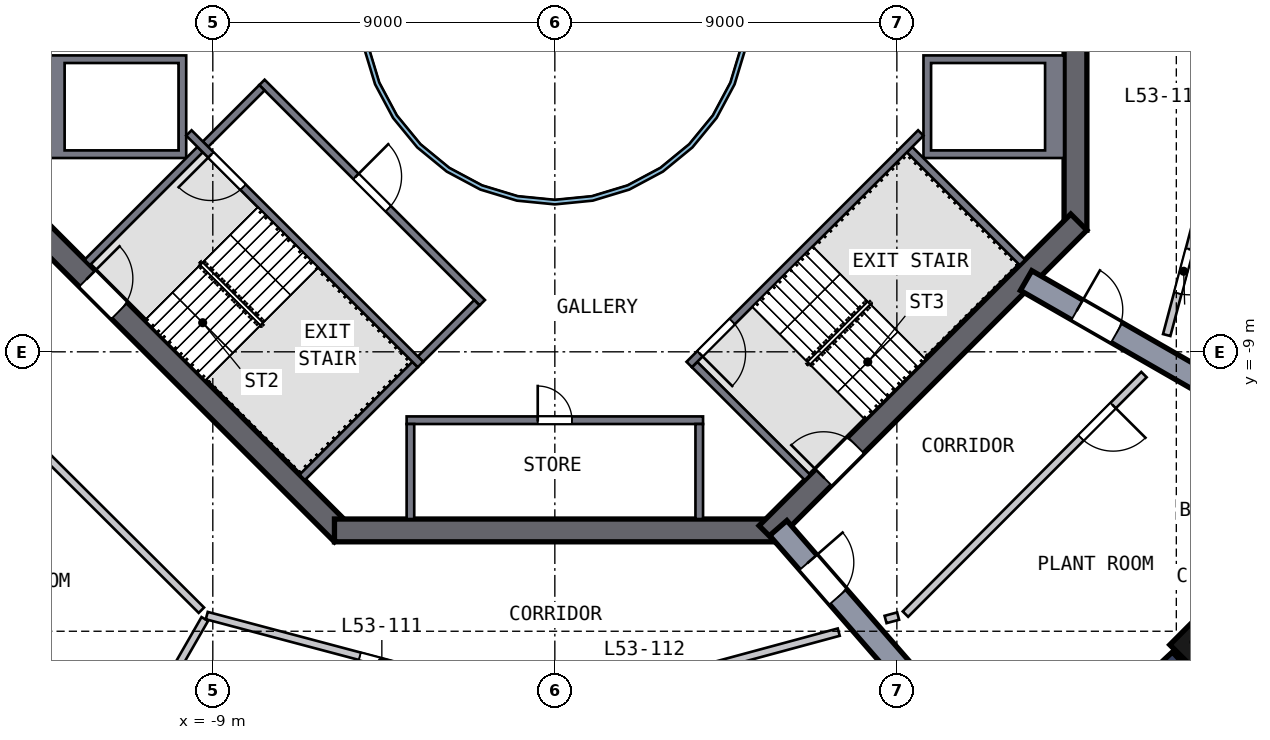
"""IFC4 building model, lengths in metres.
Left out: names, types, materials, properties, quantities, classifications, styles, units other than length and angle.
Written with IfcOpenShell. Run it as: python <this file> out.ifc"""

import sys

from ifc_helpers import new_model, si_unit, direction, frame, frame_2d, origin, origin_2d, place, context, subcontext, project, spatial, polyline, rectangle, outline, extrude, element, fill, save


model = new_model("IFC4")
c1 = context("Model", 3, precision=1e-05, world=origin(), true_north=direction((0.0, 1.0)))
c2 = subcontext(c1, "Body", "Model", "MODEL_VIEW")
j1 = project(units=[si_unit("LENGTHUNIT", "METRE"), si_unit("PLANEANGLEUNIT", "RADIAN")], contexts=[c1])
p1 = place(None, origin())
s1 = spatial("IfcSite", under=j1, at=p1, CompositionType="ELEMENT")
p2 = place(p1, origin())
s2 = spatial("IfcBuilding", under=s1, at=p2, CompositionType="ELEMENT")
p3 = place(p2, frame((0.0, 0.0, 216.0)))
s3 = spatial("IfcBuildingStorey", under=s2, at=p3, CompositionType="ELEMENT", Elevation=216.0)
p4 = place(p3, frame((16.764, -16.694, 0.0), z_axis=(0.046123414, 0.047097852, 0.997824846), x_axis=(0.704128528, 0.707006185, -0.065918668)))
e1 = element("IfcColumn", 1, at=p4, inside=s3, PredefinedType="COLUMN", context=c2, shape_type="SweptSolid", body=[
    extrude(rectangle(XDim=1.0, YDim=0.8, at=origin_2d()), origin(), (0.0, 0.0, 1.0), 4.51),
])
p5 = place(p3, frame((13.7, -5.799, 0.0), z_axis=(0.0, 0.0, 1.0), x_axis=(0.0, 1.0, 0.0)))
e2 = element("IfcWall", 2, at=p5, inside=s3, PredefinedType="SHEAR", context=c2, shape_type="SweptSolid", body=[
    extrude(rectangle(XDim=11.598, YDim=0.6, at=frame_2d((5.799, 0.0))), origin(), (0.0, 0.0, 1.0), 6.0),
])
p6 = place(p5, frame((4.899, 0.0, 0.0)))
e3 = element("IfcOpeningElement", 3, at=p6, cuts=e2, PredefinedType="OPENING", context=c2, shape_type="SweptSolid", body=[
    extrude(rectangle(XDim=1.8, YDim=2.1, at=frame_2d((0.9, 1.05))), frame((0.0, 0.31, 0.0), z_axis=(0.0, -1.0, 0.0), x_axis=(1.0, 0.0, 0.0)), (0.0, 0.0, 1.0), 0.62),
])
p7 = place(p3, frame((-13.788, -5.587, 0.0), z_axis=(0.0, 0.0, 1.0), x_axis=(0.707106781, -0.707106781, 0.0)))
e4 = element("IfcWall", 4, at=p7, inside=s3, PredefinedType="SHEAR", context=c2, shape_type="SweptSolid", body=[
    extrude(rectangle(XDim=11.598, YDim=0.6, at=frame_2d((5.799, 0.0))), origin(), (0.0, 0.0, 1.0), 6.0),
])
p8 = place(p7, frame((2.099, 0.0, 0.0)))
e5 = element("IfcOpeningElement", 5, at=p8, cuts=e4, PredefinedType="OPENING", context=c2, shape_type="SweptSolid", body=[
    extrude(rectangle(XDim=1.2, YDim=2.1, at=frame_2d((0.6, 1.05))), frame((0.0, 0.31, 0.0), z_axis=(0.0, -1.0, 0.0), x_axis=(1.0, 0.0, 0.0)), (0.0, 0.0, 1.0), 0.62),
])
p9 = place(p3, frame((-5.799, -13.7, 0.0), z_axis=(0.0, 0.0, 1.0), x_axis=(1.0, 0.0, 0.0)))
e6 = element("IfcWall", 6, at=p9, inside=s3, PredefinedType="SHEAR", context=c2, shape_type="SweptSolid", body=[
    extrude(rectangle(XDim=11.598, YDim=0.6, at=frame_2d((5.799, 0.0))), origin(), (0.0, 0.0, 1.0), 6.0),
])
p10 = place(p3, frame((5.587, -13.788, 0.0), z_axis=(0.0, 0.0, 1.0), x_axis=(0.707106781, 0.707106781, 0.0)))
e7 = element("IfcWall", 7, at=p10, inside=s3, PredefinedType="SHEAR", context=c2, shape_type="SweptSolid", body=[
    extrude(rectangle(XDim=11.598, YDim=0.6, at=frame_2d((5.799, 0.0))), origin(), (0.0, 0.0, 1.0), 6.0),
])
p11 = place(p10, frame((2.099, 0.0, 0.0)))
e8 = element("IfcOpeningElement", 8, at=p11, cuts=e7, PredefinedType="OPENING", context=c2, shape_type="SweptSolid", body=[
    extrude(rectangle(XDim=1.2, YDim=2.1, at=frame_2d((0.6, 1.05))), frame((0.0, 0.31, 0.0), z_axis=(0.0, -1.0, 0.0), x_axis=(1.0, 0.0, 0.0)), (0.0, 0.0, 1.0), 0.62),
])
p12 = place(p3, frame((-16.34, -17.117, 0.0), z_axis=(0.0, 0.0, 1.0), x_axis=(0.708579493, -0.705630996, 0.0)))
e9 = element("IfcWall", 9, at=p12, inside=s3, PredefinedType="SHEAR", context=c2, shape_type="SweptSolid", body=[
    extrude(rectangle(XDim=5.713, YDim=0.4, at=frame_2d((2.857, 0.0))), origin(), (0.0, 0.0, 1.0), 4.5),
])
p13 = place(p3, frame((12.593, -20.586, 0.0), z_axis=(0.0, 0.0, 1.0), x_axis=(0.731095933, 0.682274678, 0.0)))
e10 = element("IfcWall", 10, at=p13, inside=s3, PredefinedType="SHEAR", context=c2, shape_type="SweptSolid", body=[
    extrude(rectangle(XDim=5.191, YDim=0.4, at=frame_2d((2.595, 0.0))), origin(), (0.0, 0.0, 1.0), 4.5),
])
p14 = place(p3, frame((5.879, -13.638, 0.0), z_axis=(0.0, 0.0, 1.0), x_axis=(0.656669219, -0.754178716, 0.0)))
e11 = element("IfcWall", 11, at=p14, inside=s3, PredefinedType="SHEAR", context=c2, shape_type="SweptSolid", body=[
    extrude(rectangle(XDim=9.276, YDim=0.6, at=frame_2d((4.638, 0.0))), origin(), (0.0, 0.0, 1.0), 4.5),
])
p15 = place(p14, frame((1.2, 0.0, 0.0)))
e12 = element("IfcOpeningElement", 12, at=p15, cuts=e11, PredefinedType="OPENING", context=c2, shape_type="SweptSolid", body=[
    extrude(rectangle(XDim=1.2, YDim=2.1, at=frame_2d((0.6, 1.05))), frame((0.0, 0.31, 0.0), z_axis=(0.0, -1.0, 0.0), x_axis=(1.0, 0.0, 0.0)), (0.0, 0.0, 1.0), 0.62),
])
p16 = place(p3, frame((12.401, -7.125, 0.0), z_axis=(0.0, 0.0, 1.0), x_axis=(0.867072189, -0.498182515, 0.0)))
e13 = element("IfcWall", 13, at=p16, inside=s3, PredefinedType="SHEAR", context=c2, shape_type="SweptSolid", body=[
    extrude(rectangle(XDim=9.553, YDim=0.6, at=frame_2d((4.776, 0.0))), origin(), (0.0, 0.0, 1.0), 4.5),
])
p17 = place(p16, frame((1.55, 0.0, 0.0)))
e14 = element("IfcOpeningElement", 14, at=p17, cuts=e13, PredefinedType="OPENING", context=c2, shape_type="SweptSolid", body=[
    extrude(rectangle(XDim=1.2, YDim=2.1, at=frame_2d((0.6, 1.05))), frame((0.0, 0.31, 0.0), z_axis=(0.0, -1.0, 0.0), x_axis=(1.0, 0.0, 0.0)), (0.0, 0.0, 1.0), 0.62),
])
p18 = place(p3, frame((-21.67, -12.549, 0.0), z_axis=(0.0, 0.0, 1.0), x_axis=(0.708589659, -0.705620787, 0.0)))
e15 = element("IfcWall", 15, at=p18, inside=s3, PredefinedType="SOLIDWALL", context=c2, shape_type="SweptSolid", body=[
    extrude(rectangle(XDim=13.075, YDim=0.15, at=frame_2d((6.538, 0.0))), origin(), (0.0, 0.0, 1.0), 4.5),
])
p19 = place(p3, frame((12.549, -21.67, 0.0), z_axis=(0.0, 0.0, 1.0), x_axis=(0.705625581, 0.708584885, 0.0)))
e16 = element("IfcWall", 16, at=p19, inside=s3, PredefinedType="SOLIDWALL", context=c2, shape_type="SweptSolid", body=[
    extrude(rectangle(XDim=13.035, YDim=0.15, at=frame_2d((6.518, 0.0))), origin(), (0.0, 0.0, 1.0), 4.5),
])
p20 = place(p3, origin())
e17 = element("IfcWall", 17, at=p20, inside=s3, PredefinedType="SOLIDWALL", context=c2, shape_type="SweptSolid", body=[
    extrude(outline(polyline([(13.4, -1.2), (13.4, -3.9), (9.7, -3.9), (9.7, -1.2), (13.4, -1.2)]), holes=[polyline([(9.9, -3.7), (12.9, -3.7), (12.9, -1.4), (9.9, -1.4), (9.9, -3.7)])]), origin(), (0.0, 0.0, 1.0), 5.55),
])
p21 = place(p3, origin())
e18 = element("IfcWall", 18, at=p21, inside=s3, PredefinedType="SOLIDWALL", context=c2, shape_type="SweptSolid", body=[
    extrude(outline(polyline([(-9.7, -3.9), (-13.4, -3.9), (-13.4, -1.2), (-9.7, -1.2), (-9.7, -3.9)]), holes=[polyline([(-12.9, -1.4), (-12.9, -3.7), (-9.9, -3.7), (-9.9, -1.4), (-12.9, -1.4)])]), origin(), (0.0, 0.0, 1.0), 5.55),
])
p22 = place(p3, frame((-3.9, -10.8, 0.0), z_axis=(0.0, 0.0, 1.0), x_axis=(1.0, 0.0, 0.0)))
e19 = element("IfcWall", 19, at=p22, inside=s3, PredefinedType="SOLIDWALL", context=c2, shape_type="SweptSolid", body=[
    extrude(rectangle(XDim=7.8, YDim=0.2, at=frame_2d((3.9, 0.0))), origin(), (0.0, 0.0, 1.0), 5.55),
])
p23 = place(p22, frame((3.45, 0.0, 0.0)))
e20 = element("IfcOpeningElement", 20, at=p23, cuts=e19, PredefinedType="OPENING", context=c2, shape_type="SweptSolid", body=[
    extrude(rectangle(XDim=0.9, YDim=2.1, at=frame_2d((0.45, 1.05))), frame((0.0, 0.11, 0.0), z_axis=(0.0, -1.0, 0.0), x_axis=(1.0, 0.0, 0.0)), (0.0, 0.0, 1.0), 0.22),
])
for number, where, z_axis, x_axis in (
    (21, (-3.8, -10.9, 0.0), (0.0, 0.0, 1.0), (0.0, -1.0, 0.0)),
    (22, (3.8, -10.9, 0.0), (0.0, 0.0, 1.0), (0.0, -1.0, 0.0)),
):
    element("IfcWall", number, at=place(p3, frame(where, z_axis=z_axis, x_axis=x_axis)), inside=s3, PredefinedType="SOLIDWALL", context=c2, shape_type="SweptSolid", body=[
        extrude(rectangle(XDim=2.5, YDim=0.2, at=frame_2d((1.25, 0.0))), origin(), (0.0, 0.0, 1.0), 5.55),
    ])
p24 = place(p3, frame((-3.535, -9.334, 0.0), z_axis=(0.0, 0.0, 1.0), x_axis=(-0.707120946, 0.707092617, 0.0)))
e23 = element("IfcWall", 23, at=p24, inside=s3, PredefinedType="SOLIDWALL", context=c2, shape_type="SweptSolid", body=[
    extrude(rectangle(XDim=8.618, YDim=0.2, at=frame_2d((4.309, 0.0))), origin(), (0.0, 0.0, 1.0), 5.55),
])
p25 = place(p24, frame((6.6, 0.0, 0.0)))
e24 = element("IfcOpeningElement", 24, at=p25, cuts=e23, PredefinedType="OPENING", context=c2, shape_type="SweptSolid", body=[
    extrude(rectangle(XDim=1.2, YDim=2.1, at=frame_2d((0.6, 1.05))), frame((0.0, 0.11, 0.0), z_axis=(0.0, -1.0, 0.0), x_axis=(1.0, 0.0, 0.0)), (0.0, 0.0, 1.0), 0.22),
])
for number, where, z_axis, x_axis in (
    (25, (-9.334, -3.677, 0.0), (0.0, 0.0, 1.0), (-0.707, -0.707, 0.0)),
    (26, (-3.677, -9.334, 0.0), (0.0, 0.0, 1.0), (-0.707, -0.707, 0.0)),
):
    element("IfcWall", number, at=place(p3, frame(where, z_axis=z_axis, x_axis=x_axis)), inside=s3, PredefinedType="SOLIDWALL", context=c2, shape_type="SweptSolid", body=[
        extrude(rectangle(XDim=4.2, YDim=0.2, at=frame_2d((2.1, 0.0))), origin(), (0.0, 0.0, 1.0), 5.55),
    ])
p26 = place(p3, frame((9.629, -3.24, 0.0), z_axis=(0.0, 0.0, 1.0), x_axis=(-0.707120946, -0.707092617, 0.0)))
e27 = element("IfcWall", 27, at=p26, inside=s3, PredefinedType="SOLIDWALL", context=c2, shape_type="SweptSolid", body=[
    extrude(rectangle(XDim=8.618, YDim=0.2, at=frame_2d((4.309, 0.0))), origin(), (0.0, 0.0, 1.0), 5.55),
])
p27 = place(p26, frame((7.018, 0.0, 0.0)))
e28 = element("IfcOpeningElement", 28, at=p27, cuts=e27, PredefinedType="OPENING", context=c2, shape_type="SweptSolid", body=[
    extrude(rectangle(XDim=1.2, YDim=2.1, at=frame_2d((0.6, 1.05))), frame((0.0, 0.11, 0.0), z_axis=(0.0, -1.0, 0.0), x_axis=(1.0, 0.0, 0.0)), (0.0, 0.0, 1.0), 0.22),
])
for number, where, z_axis, x_axis in (
    (29, (3.677, -9.334, 0.0), (0.0, 0.0, 1.0), (0.707, -0.707, 0.0)),
    (30, (9.334, -3.677, 0.0), (0.0, 0.0, 1.0), (0.707, -0.707, 0.0)),
):
    element("IfcWall", number, at=place(p3, frame(where, z_axis=z_axis, x_axis=x_axis)), inside=s3, PredefinedType="SOLIDWALL", context=c2, shape_type="SweptSolid", body=[
        extrude(rectangle(XDim=4.2, YDim=0.2, at=frame_2d((2.1, 0.0))), origin(), (0.0, 0.0, 1.0), 5.55),
    ])
p28 = place(p3, frame((-7.708, -1.909, 0.0), z_axis=(0.0, 0.0, 1.0), x_axis=(0.707106781, -0.707106781, 0.0)))
e31 = element("IfcWall", 31, at=p28, inside=s3, PredefinedType="SOLIDWALL", context=c2, shape_type="SweptSolid", body=[
    extrude(rectangle(XDim=8.2, YDim=0.2, at=frame_2d((4.1, 0.0))), origin(), (0.0, 0.0, 1.0), 5.55),
])
p29 = place(p28, frame((3.5, 0.0, 0.0)))
e32 = element("IfcOpeningElement", 32, at=p29, cuts=e31, PredefinedType="OPENING", context=c2, shape_type="SweptSolid", body=[
    extrude(rectangle(XDim=1.2, YDim=2.1, at=frame_2d((0.6, 1.05))), frame((0.0, 0.11, 0.0), z_axis=(0.0, -1.0, 0.0), x_axis=(1.0, 0.0, 0.0)), (0.0, 0.0, 1.0), 0.22),
])
for number, where, z_axis, x_axis in (
    (33, (-7.708, -2.051, 0.0), (0.0, 0.0, 1.0), (-0.707, -0.707, 0.0)),
    (34, (-2.051, -7.708, 0.0), (0.0, 0.0, 1.0), (-0.707, -0.707, 0.0)),
):
    element("IfcWall", number, at=place(p3, frame(where, z_axis=z_axis, x_axis=x_axis)), inside=s3, PredefinedType="SOLIDWALL", context=c2, shape_type="SweptSolid", body=[
        extrude(rectangle(XDim=2.1, YDim=0.2, at=frame_2d((1.05, 0.0))), origin(), (0.0, 0.0, 1.0), 5.55),
    ])
p30 = place(p3, origin())
e35 = element("IfcWall", 35, at=p30, inside=s3, PredefinedType="SOLIDWALL", context=c2, shape_type="SweptSolid", body=[
    extrude(outline(polyline([(5.021, -0.999), (4.73, -1.959), (4.257, -2.844), (3.62, -3.62), (2.844, -4.257), (1.959, -4.73), (0.999, -5.021), (0.0, -5.12), (-0.999, -5.021), (-1.959, -4.73), (-2.844, -4.257), (-3.62, -3.62), (-4.257, -2.844), (-4.73, -1.959), (-5.021, -0.999), (-5.12, 0.0), (-5.021, 0.999), (-4.73, 1.959), (-4.257, 2.844), (-3.62, 3.62), (-2.844, 4.257), (-1.959, 4.73), (-0.999, 5.021), (0.0, 5.12), (0.999, 5.021), (1.959, 4.73), (2.844, 4.257), (3.62, 3.62), (4.257, 2.844), (4.73, 1.959), (5.021, 0.999), (5.12, 0.0), (5.021, -0.999)]), holes=[polyline([(4.904, 0.976), (4.619, 1.913), (4.157, 2.778), (3.535, 3.535), (2.778, 4.157), (1.913, 4.619), (0.976, 4.904), (0.0, 5.0), (-0.976, 4.904), (-1.913, 4.619), (-2.778, 4.157), (-3.535, 3.535), (-4.157, 2.778), (-4.619, 1.913), (-4.904, 0.976), (-5.0, 0.0), (-4.904, -0.976), (-4.619, -1.913), (-4.157, -2.778), (-3.535, -3.535), (-2.778, -4.157), (-1.913, -4.619), (-0.976, -4.904), (0.0, -5.0), (0.976, -4.904), (1.913, -4.619), (2.778, -4.157), (3.535, -3.535), (4.157, -2.778), (4.619, -1.913), (4.904, -0.976), (5.0, 0.0), (4.904, 0.976)])]), origin(), (0.0, 0.0, 1.0), 5.55),
])
p31 = place(p3, frame((-9.301, -15.8, 0.0), z_axis=(0.0, 0.0, 1.0), x_axis=(-0.708572717, 0.7056378, 0.0)))
e36 = element("IfcWall", 36, at=p31, inside=s3, PredefinedType="SOLIDWALL", context=c2, shape_type="SweptSolid", body=[
    extrude(rectangle(XDim=9.317, YDim=0.2, at=frame_2d((4.658, 0.0))), origin(), (0.0, 0.0, 1.0), 4.5),
])
p32 = place(p31, frame((6.35, 0.0, 0.0)))
e37 = element("IfcOpeningElement", 37, at=p32, cuts=e36, PredefinedType="OPENING", context=c2, shape_type="SweptSolid", body=[
    extrude(rectangle(XDim=1.2, YDim=2.1, at=frame_2d((0.6, 1.05))), frame((0.0, 0.11, 0.0), z_axis=(0.0, -1.0, 0.0), x_axis=(1.0, 0.0, 0.0)), (0.0, 0.0, 1.0), 0.22),
])
p33 = place(p3, frame((-9.211, -16.031, 0.0), z_axis=(0.0, 0.0, 1.0), x_axis=(-0.498162659, -0.867083598, 0.0)))
e38 = element("IfcWall", 38, at=p33, inside=s3, PredefinedType="SOLIDWALL", context=c2, shape_type="SweptSolid", body=[
    extrude(rectangle(XDim=5.726, YDim=0.2, at=frame_2d((2.863, 0.0))), origin(), (0.0, 0.0, 1.0), 4.5),
])
p34 = place(p3, frame((0.039, -18.385, 0.0), z_axis=(0.0, 0.0, 1.0), x_axis=(-0.966465332, 0.256797122, 0.0)))
e39 = element("IfcWall", 39, at=p34, inside=s3, PredefinedType="SOLIDWALL", context=c2, shape_type="SweptSolid", body=[
    extrude(rectangle(XDim=9.517, YDim=0.2, at=frame_2d((4.758, 0.0))), origin(), (0.0, 0.0, 1.0), 4.5),
])
p35 = place(p34, frame((4.15, 0.0, 0.0)))
e40 = element("IfcOpeningElement", 40, at=p35, cuts=e39, PredefinedType="OPENING", context=c2, shape_type="SweptSolid", body=[
    extrude(rectangle(XDim=1.2, YDim=2.1, at=frame_2d((0.6, 1.05))), frame((0.0, 0.11, 0.0), z_axis=(0.0, -1.0, 0.0), x_axis=(1.0, 0.0, 0.0)), (0.0, 0.0, 1.0), 0.22),
])
p36 = place(p3, frame((7.471, -16.377, 0.0), z_axis=(0.0, 0.0, 1.0), x_axis=(-0.965386218, -0.260824559, 0.0)))
e41 = element("IfcWall", 41, at=p36, inside=s3, PredefinedType="SOLIDWALL", context=c2, shape_type="SweptSolid", body=[
    extrude(rectangle(XDim=7.499, YDim=0.2, at=frame_2d((3.749, 0.0))), origin(), (0.0, 0.0, 1.0), 4.5),
])
p37 = place(p36, frame((4.7, 0.0, 0.0)))
e42 = element("IfcOpeningElement", 42, at=p37, cuts=e41, PredefinedType="OPENING", context=c2, shape_type="SweptSolid", body=[
    extrude(rectangle(XDim=1.2, YDim=2.1, at=frame_2d((0.6, 1.05))), frame((0.0, 0.11, 0.0), z_axis=(0.0, -1.0, 0.0), x_axis=(1.0, 0.0, 0.0)), (0.0, 0.0, 1.0), 0.22),
])
p38 = place(p3, frame((8.703, -16.044, 0.0), z_axis=(0.0, 0.0, 1.0), x_axis=(0.96543627, 0.26063923, 0.0)))
e43 = element("IfcWall", 43, at=p38, inside=s3, PredefinedType="SOLIDWALL", context=c2, shape_type="SweptSolid", body=[
    extrude(rectangle(XDim=0.342, YDim=0.2, at=frame_2d((0.171, 0.0))), origin(), (0.0, 0.0, 1.0), 4.5),
])
p39 = place(p3, frame((15.503, -9.599, 0.0), z_axis=(0.0, 0.0, 1.0), x_axis=(-0.705636952, -0.708573561, 0.0)))
e44 = element("IfcWall", 44, at=p39, inside=s3, PredefinedType="SOLIDWALL", context=c2, shape_type="SweptSolid", body=[
    extrude(rectangle(XDim=8.896, YDim=0.2, at=frame_2d((4.448, 0.0))), origin(), (0.0, 0.0, 1.0), 4.5),
])
p40 = place(p39, frame((1.15, 0.0, 0.0)))
e45 = element("IfcOpeningElement", 45, at=p40, cuts=e44, PredefinedType="OPENING", context=c2, shape_type="SweptSolid", body=[
    extrude(rectangle(XDim=1.2, YDim=2.1, at=frame_2d((0.6, 1.05))), frame((0.0, 0.11, 0.0), z_axis=(0.0, -1.0, 0.0), x_axis=(1.0, 0.0, 0.0)), (0.0, 0.0, 1.0), 0.22),
])
p41 = place(p3, frame((17.111, -4.754, 0.0), z_axis=(0.0, 0.0, 1.0), x_axis=(-0.256794113, -0.966466132, 0.0)))
e46 = element("IfcWall", 46, at=p41, inside=s3, PredefinedType="SOLIDWALL", context=c2, shape_type="SweptSolid", body=[
    extrude(rectangle(XDim=3.937, YDim=0.2, at=frame_2d((1.969, 0.0))), origin(), (0.0, 0.0, 1.0), 4.5),
])
p42 = place(p41, frame((1.6, 0.0, 0.0)))
e47 = element("IfcOpeningElement", 47, at=p42, cuts=e46, PredefinedType="OPENING", context=c2, shape_type="SweptSolid", body=[
    extrude(rectangle(XDim=1.2, YDim=2.1, at=frame_2d((0.6, 1.05))), frame((0.0, 0.11, 0.0), z_axis=(0.0, -1.0, 0.0), x_axis=(1.0, 0.0, 0.0)), (0.0, 0.0, 1.0), 0.22),
])
p43 = place(p23, origin())
e48 = element("IfcDoor", 48, at=p43, inside=s3, OperationType="SINGLE_SWING_LEFT", PredefinedType="DOOR", context=c2, shape_type="SweptSolid", body=[
    extrude(rectangle(XDim=0.9, YDim=2.1, at=frame_2d((0.45, 1.05))), frame((0.0, 0.025, 0.0), z_axis=(0.0, -1.0, 0.0), x_axis=(1.0, 0.0, 0.0)), (0.0, 0.0, 1.0), 0.05),
])
fill(e20, e48)
p44 = place(p25, origin())
e49 = element("IfcDoor", 49, at=p44, inside=s3, OperationType="SINGLE_SWING_RIGHT", PredefinedType="DOOR", context=c2, shape_type="SweptSolid", body=[
    extrude(rectangle(XDim=1.2, YDim=2.1, at=frame_2d((0.6, 1.05))), frame((0.0, 0.025, 0.0), z_axis=(0.0, -1.0, 0.0), x_axis=(1.0, 0.0, 0.0)), (0.0, 0.0, 1.0), 0.05),
])
fill(e24, e49)
p45 = place(p27, origin())
e50 = element("IfcDoor", 50, at=p45, inside=s3, OperationType="SINGLE_SWING_RIGHT", PredefinedType="DOOR", context=c2, shape_type="SweptSolid", body=[
    extrude(rectangle(XDim=1.2, YDim=2.1, at=frame_2d((0.6, 1.05))), frame((0.0, 0.025, 0.0), z_axis=(0.0, -1.0, 0.0), x_axis=(1.0, 0.0, 0.0)), (0.0, 0.0, 1.0), 0.05),
])
fill(e28, e50)
p46 = place(p8, origin())
e51 = element("IfcDoor", 51, at=p46, inside=s3, OperationType="SINGLE_SWING_LEFT", PredefinedType="DOOR", context=c2, shape_type="SweptSolid", body=[
    extrude(rectangle(XDim=1.2, YDim=2.1, at=frame_2d((0.6, 1.05))), frame((0.0, 0.025, 0.0), z_axis=(0.0, -1.0, 0.0), x_axis=(1.0, 0.0, 0.0)), (0.0, 0.0, 1.0), 0.05),
])
fill(e5, e51)
p47 = place(p11, origin())
e52 = element("IfcDoor", 52, at=p47, inside=s3, OperationType="SINGLE_SWING_LEFT", PredefinedType="DOOR", context=c2, shape_type="SweptSolid", body=[
    extrude(rectangle(XDim=1.2, YDim=2.1, at=frame_2d((0.6, 1.05))), frame((0.0, 0.025, 0.0), z_axis=(0.0, -1.0, 0.0), x_axis=(1.0, 0.0, 0.0)), (0.0, 0.0, 1.0), 0.05),
])
fill(e8, e52)
p48 = place(p29, origin())
e53 = element("IfcDoor", 53, at=p48, inside=s3, OperationType="SINGLE_SWING_LEFT", PredefinedType="DOOR", context=c2, shape_type="SweptSolid", body=[
    extrude(rectangle(XDim=1.2, YDim=2.1, at=frame_2d((0.6, 1.05))), frame((0.0, 0.025, 0.0), z_axis=(0.0, -1.0, 0.0), x_axis=(1.0, 0.0, 0.0)), (0.0, 0.0, 1.0), 0.05),
])
fill(e32, e53)
p49 = place(p15, origin())
e54 = element("IfcDoor", 54, at=p49, inside=s3, OperationType="SINGLE_SWING_LEFT", PredefinedType="DOOR", context=c2, shape_type="SweptSolid", body=[
    extrude(rectangle(XDim=1.2, YDim=2.1, at=frame_2d((0.6, 1.05))), frame((0.0, 0.025, 0.0), z_axis=(0.0, -1.0, 0.0), x_axis=(1.0, 0.0, 0.0)), (0.0, 0.0, 1.0), 0.05),
])
fill(e12, e54)
p50 = place(p17, origin())
e55 = element("IfcDoor", 55, at=p50, inside=s3, OperationType="SINGLE_SWING_LEFT", PredefinedType="DOOR", context=c2, shape_type="SweptSolid", body=[
    extrude(rectangle(XDim=1.2, YDim=2.1, at=frame_2d((0.6, 1.05))), frame((0.0, 0.025, 0.0), z_axis=(0.0, -1.0, 0.0), x_axis=(1.0, 0.0, 0.0)), (0.0, 0.0, 1.0), 0.05),
])
fill(e14, e55)
p51 = place(p35, origin())
e56 = element("IfcDoor", 56, at=p51, inside=s3, OperationType="SINGLE_SWING_LEFT", PredefinedType="DOOR", context=c2, shape_type="SweptSolid", body=[
    extrude(rectangle(XDim=1.2, YDim=2.1, at=frame_2d((0.6, 1.05))), frame((0.0, 0.025, 0.0), z_axis=(0.0, -1.0, 0.0), x_axis=(1.0, 0.0, 0.0)), (0.0, 0.0, 1.0), 0.05),
])
fill(e40, e56)
p52 = place(p40, origin())
e57 = element("IfcDoor", 57, at=p52, inside=s3, OperationType="SINGLE_SWING_LEFT", PredefinedType="DOOR", context=c2, shape_type="SweptSolid", body=[
    extrude(rectangle(XDim=1.2, YDim=2.1, at=frame_2d((0.6, 1.05))), frame((0.0, 0.025, 0.0), z_axis=(0.0, -1.0, 0.0), x_axis=(1.0, 0.0, 0.0)), (0.0, 0.0, 1.0), 0.05),
])
fill(e45, e57)
p53 = place(p42, origin())
e58 = element("IfcDoor", 58, at=p53, inside=s3, OperationType="SINGLE_SWING_LEFT", PredefinedType="DOOR", context=c2, shape_type="SweptSolid", body=[
    extrude(rectangle(XDim=1.2, YDim=2.1, at=frame_2d((0.6, 1.05))), frame((0.0, 0.025, 0.0), z_axis=(0.0, -1.0, 0.0), x_axis=(1.0, 0.0, 0.0)), (0.0, 0.0, 1.0), 0.05),
])
fill(e47, e58)
save(model, sys.argv[1])
